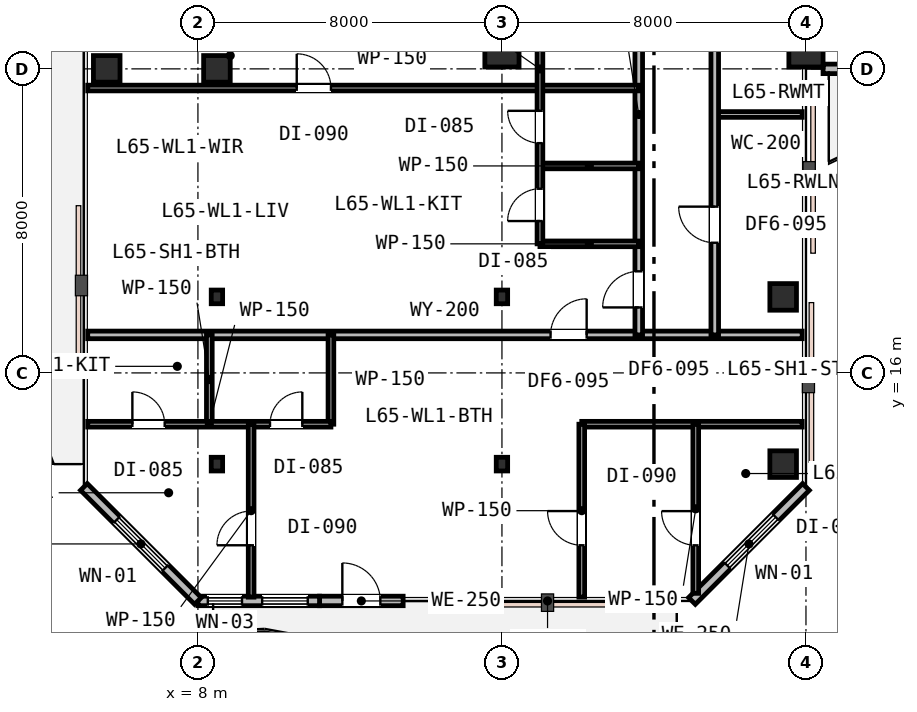
"""IFC4 building model, lengths in metres.
Left out: names, types, materials, properties, quantities, classifications, styles, units other than length and angle.
Written with IfcOpenShell. Run it as: python <this file> out.ifc"""

import sys

from ifc_helpers import new_model, si_unit, direction, frame, frame_2d, origin, origin_2d, place, context, subcontext, project, spatial, rectangle, i_section, extrude, element, fill, save


model = new_model("IFC4")
c1 = context("Model", 3, precision=1e-05, world=origin(), true_north=direction((0.0, 1.0)))
c2 = subcontext(c1, "Body", "Model", "MODEL_VIEW")
j1 = project(units=[si_unit("LENGTHUNIT", "METRE"), si_unit("PLANEANGLEUNIT", "RADIAN")], contexts=[c1])
p1 = place(None, origin())
s1 = spatial("IfcSite", under=j1, at=p1, CompositionType="ELEMENT")
p2 = place(p1, origin())
s2 = spatial("IfcBuilding", under=s1, at=p2, CompositionType="ELEMENT")
p3 = place(p2, frame((0.0, 0.0, 252.6)))
s3 = spatial("IfcBuildingStorey", under=s2, at=p3, CompositionType="ELEMENT", Elevation=252.6)
p4 = place(p3, frame((8.5, 24.0, 0.0), z_axis=(0.0, 0.0, 1.0), x_axis=(1.0, 0.0, 0.0)))
e1 = element("IfcColumn", 1, at=p4, inside=s3, PredefinedType="COLUMN", context=c2, shape_type="SweptSolid", body=[
    extrude(rectangle(XDim=0.7, YDim=0.7, at=origin_2d()), origin(), (0.0, 0.0, 1.0), 3.8),
])
for number, where, z_axis, x_axis in (
    (2, (16.0, 24.5, 0.0), (0.0, 0.0, 1.0), (1.0, 0.0, 0.0)),
    (3, (24.0, 24.5, 0.0), (0.0, 0.0, 1.0), (1.0, 0.0, 0.0)),
):
    element("IfcColumn", number, at=place(p3, frame(where, z_axis=z_axis, x_axis=x_axis)), inside=s3, PredefinedType="COLUMN", context=c2, shape_type="SweptSolid", body=[
        extrude(rectangle(XDim=0.9, YDim=0.9, at=origin_2d()), origin(), (0.0, 0.0, 1.0), 3.8),
    ])
for number, where, z_axis, x_axis in (
    (4, (5.6, 24.0, 0.0), (0.0, 0.0, 1.0), (1.0, 0.0, 0.0)),
    (5, (23.4, 13.6, 0.0), (0.0, 0.0, 1.0), (1.0, 0.0, 0.0)),
    (6, (23.4, 18.0, 0.0), (0.0, 0.0, 1.0), (1.0, 0.0, 0.0)),
):
    element("IfcColumn", number, at=place(p3, frame(where, z_axis=z_axis, x_axis=x_axis)), inside=s3, PredefinedType="COLUMN", context=c2, shape_type="SweptSolid", body=[
        extrude(rectangle(XDim=0.7, YDim=0.7, at=origin_2d()), origin(), (0.0, 0.0, 1.0), 3.8),
    ])
for number, where, z_axis, x_axis in (
    (7, (8.5, 13.6, 0.0), (0.0, 0.0, 1.0), (1.0, 0.0, 0.0)),
    (8, (16.0, 13.6, 0.0), (0.0, 0.0, 1.0), (1.0, 0.0, 0.0)),
    (9, (8.5, 18.0, 0.0), (0.0, 0.0, 1.0), (1.0, 0.0, 0.0)),
    (10, (16.0, 18.0, 0.0), (0.0, 0.0, 1.0), (1.0, 0.0, 0.0)),
):
    element("IfcColumn", number, at=place(p3, frame(where, z_axis=z_axis, x_axis=x_axis)), inside=s3, PredefinedType="COLUMN", context=c2, shape_type="SweptSolid", body=[
        extrude(i_section(OverallWidth=0.3, OverallDepth=0.36, WebThickness=0.013, FlangeThickness=0.022, FilletRadius=0.027, at=origin_2d()), origin(), (0.0, 0.0, 1.0), 3.8),
    ])
p5 = place(p3, frame((11.2, 10.0, 0.0), z_axis=(0.0, 0.0, 1.0), x_axis=(1.0, 0.0, 0.0)))
e11 = element("IfcWall", 11, at=p5, inside=s3, PredefinedType="STANDARD", context=c2, shape_type="SweptSolid", body=[
    extrude(rectangle(XDim=2.2, YDim=0.25, at=frame_2d((1.1, 0.0))), origin(), (0.0, 0.0, 1.0), 3.53),
])
p6 = place(p5, frame((0.6, 0.0, 0.0)))
e12 = element("IfcOpeningElement", 12, at=p6, cuts=e11, PredefinedType="OPENING", context=c2, shape_type="SweptSolid", body=[
    extrude(rectangle(XDim=1.0, YDim=2.15, at=frame_2d((0.5, 1.075))), frame((0.0, 0.135, 0.0), z_axis=(0.0, -1.0, 0.0), x_axis=(1.0, 0.0, 0.0)), (0.0, 0.0, 1.0), 0.27),
])
p7 = place(p3, frame((8.0, 10.0, 0.0), z_axis=(0.0, 0.0, 1.0), x_axis=(1.0, 0.0, 0.0)))
e13 = element("IfcWall", 13, at=p7, inside=s3, PredefinedType="STANDARD", context=c2, shape_type="SweptSolid", body=[
    extrude(rectangle(XDim=3.2, YDim=0.25, at=frame_2d((1.6, 0.0))), origin(), (0.0, 0.0, 1.0), 3.53),
])
p8 = place(p7, frame((0.26, 0.0, 0.9)))
e14 = element("IfcOpeningElement", 14, at=p8, cuts=e13, PredefinedType="OPENING", context=c2, shape_type="SweptSolid", body=[
    extrude(rectangle(XDim=0.9, YDim=1.55, at=frame_2d((0.45, 0.775))), frame((0.0, 0.135, 0.0), z_axis=(0.0, -1.0, 0.0), x_axis=(1.0, 0.0, 0.0)), (0.0, 0.0, 1.0), 0.27),
])
p9 = place(p7, frame((1.69, 0.0, 0.85)))
e15 = element("IfcOpeningElement", 15, at=p9, cuts=e13, PredefinedType="OPENING", context=c2, shape_type="SweptSolid", body=[
    extrude(rectangle(XDim=1.2, YDim=1.6, at=frame_2d((0.6, 0.8))), frame((0.0, 0.135, 0.0), z_axis=(0.0, -1.0, 0.0), x_axis=(1.0, 0.0, 0.0)), (0.0, 0.0, 1.0), 0.27),
])
p10 = place(p3, frame((21.0, 10.0, 0.0), z_axis=(0.0, 0.0, 1.0), x_axis=(0.707106781187, 0.707106781187, 0.0)))
e16 = element("IfcWall", 16, at=p10, inside=s3, PredefinedType="STANDARD", context=c2, shape_type="SweptSolid", body=[
    extrude(rectangle(XDim=4.243, YDim=0.25, at=frame_2d((2.121, 0.0))), origin(), (0.0, 0.0, 1.0), 3.53),
])
p11 = place(p10, frame((1.317, 0.0, 0.75)))
e17 = element("IfcOpeningElement", 17, at=p11, cuts=e16, PredefinedType="OPENING", context=c2, shape_type="SweptSolid", body=[
    extrude(rectangle(XDim=1.8, YDim=1.85, at=frame_2d((0.9, 0.925))), frame((0.0, 0.135, 0.0), z_axis=(0.0, -1.0, 0.0), x_axis=(1.0, 0.0, 0.0)), (0.0, 0.0, 1.0), 0.27),
])
p12 = place(p3, frame((24.45, 24.0, 0.0), z_axis=(0.0, 0.0, 1.0), x_axis=(1.0, 0.0, 0.0)))
e18 = element("IfcWall", 18, at=p12, inside=s3, PredefinedType="STANDARD", context=c2, shape_type="SweptSolid", body=[
    extrude(rectangle(XDim=0.95, YDim=0.25, at=frame_2d((0.475, 0.0))), origin(), (0.0, 0.0, 1.0), 3.27),
])
p13 = place(p3, frame((5.0, 13.0, 0.0), z_axis=(0.0, 0.0, 1.0), x_axis=(0.707106781187, -0.707106781187, 0.0)))
e19 = element("IfcWall", 19, at=p13, inside=s3, PredefinedType="STANDARD", context=c2, shape_type="SweptSolid", body=[
    extrude(rectangle(XDim=4.243, YDim=0.25, at=frame_2d((2.121, 0.0))), origin(), (0.0, 0.0, 1.0), 3.53),
])
p14 = place(p13, frame((1.221, 0.0, 0.75)))
e20 = element("IfcOpeningElement", 20, at=p14, cuts=e19, PredefinedType="OPENING", context=c2, shape_type="SweptSolid", body=[
    extrude(rectangle(XDim=1.8, YDim=1.85, at=frame_2d((0.9, 0.925))), frame((0.0, 0.135, 0.0), z_axis=(0.0, -1.0, 0.0), x_axis=(1.0, 0.0, 0.0)), (0.0, 0.0, 1.0), 0.27),
])
p15 = place(p3, frame((5.1, 17.0, 0.0), z_axis=(0.0, 0.0, 1.0), x_axis=(1.0, 0.0, 0.0)))
e21 = element("IfcWall", 21, at=p15, inside=s3, PredefinedType="PARTITIONING", context=c2, shape_type="SweptSolid", body=[
    extrude(rectangle(XDim=18.8, YDim=0.2, at=frame_2d((9.4, 0.0))), origin(), (0.0, 0.0, 1.0), 3.16),
])
p16 = place(p15, frame((12.179, 0.0, 0.0)))
e22 = element("IfcOpeningElement", 22, at=p16, cuts=e21, PredefinedType="OPENING", context=c2, shape_type="SweptSolid", body=[
    extrude(rectangle(XDim=0.95, YDim=2.15, at=frame_2d((0.475, 1.075))), frame((0.0, 0.11, 0.0), z_axis=(0.0, -1.0, 0.0), x_axis=(1.0, 0.0, 0.0)), (0.0, 0.0, 1.0), 0.22),
])
p17 = place(p3, frame((19.6, 17.0, 0.0), z_axis=(0.0, 0.0, 1.0), x_axis=(0.0, 1.0, 0.0)))
e23 = element("IfcWall", 23, at=p17, inside=s3, PredefinedType="PARTITIONING", context=c2, shape_type="SweptSolid", body=[
    extrude(rectangle(XDim=11.6, YDim=0.2, at=frame_2d((5.8, 0.0))), origin(), (0.0, 0.0, 1.0), 3.16),
])
p18 = place(p17, frame((0.723, 0.0, 0.0)))
e24 = element("IfcOpeningElement", 24, at=p18, cuts=e23, PredefinedType="OPENING", context=c2, shape_type="SweptSolid", body=[
    extrude(rectangle(XDim=0.95, YDim=2.15, at=frame_2d((0.475, 1.075))), frame((0.0, 0.11, 0.0), z_axis=(0.0, -1.0, 0.0), x_axis=(1.0, 0.0, 0.0)), (0.0, 0.0, 1.0), 0.22),
])
for number, where, z_axis, x_axis in (
    (25, (17.0, 19.396, 0.0), (0.0, 0.0, 1.0), (1.0, 0.0, 0.0)),
    (26, (17.0, 21.446, 0.0), (0.0, 0.0, 1.0), (1.0, 0.0, 0.0)),
):
    element("IfcWall", number, at=place(p3, frame(where, z_axis=z_axis, x_axis=x_axis)), inside=s3, PredefinedType="PARTITIONING", context=c2, shape_type="SweptSolid", body=[
        extrude(rectangle(XDim=2.6, YDim=0.15, at=frame_2d((1.3, 0.0))), origin(), (0.0, 0.0, 1.0), 3.53),
    ])
p19 = place(p3, frame((5.1, 23.496, 0.0), z_axis=(0.0, 0.0, 1.0), x_axis=(1.0, 0.0, 0.0)))
e27 = element("IfcWall", 27, at=p19, inside=s3, PredefinedType="PARTITIONING", context=c2, shape_type="SweptSolid", body=[
    extrude(rectangle(XDim=14.5, YDim=0.15, at=frame_2d((7.25, 0.0))), origin(), (0.0, 0.0, 1.0), 3.16),
])
p20 = place(p19, frame((5.5, 0.0, 0.0)))
e28 = element("IfcOpeningElement", 28, at=p20, cuts=e27, PredefinedType="OPENING", context=c2, shape_type="SweptSolid", body=[
    extrude(rectangle(XDim=0.9, YDim=2.15, at=frame_2d((0.45, 1.075))), frame((0.0, 0.085, 0.0), z_axis=(0.0, -1.0, 0.0), x_axis=(1.0, 0.0, 0.0)), (0.0, 0.0, 1.0), 0.17),
])
p21 = place(p3, frame((17.0, 19.396, 0.0), z_axis=(0.0, 0.0, 1.0), x_axis=(0.0, 1.0, 0.0)))
e29 = element("IfcWall", 29, at=p21, inside=s3, PredefinedType="PARTITIONING", context=c2, shape_type="SweptSolid", body=[
    extrude(rectangle(XDim=9.204, YDim=0.15, at=frame_2d((4.602, 0.0))), origin(), (0.0, 0.0, 1.0), 3.16),
])
p22 = place(p21, frame((0.6, 0.0, 0.0)))
e30 = element("IfcOpeningElement", 30, at=p22, cuts=e29, PredefinedType="OPENING", context=c2, shape_type="SweptSolid", body=[
    extrude(rectangle(XDim=0.85, YDim=2.15, at=frame_2d((0.425, 1.075))), frame((0.0, 0.085, 0.0), z_axis=(0.0, -1.0, 0.0), x_axis=(1.0, 0.0, 0.0)), (0.0, 0.0, 1.0), 0.17),
])
p23 = place(p21, frame((2.65, 0.0, 0.0)))
e31 = element("IfcOpeningElement", 31, at=p23, cuts=e29, PredefinedType="OPENING", context=c2, shape_type="SweptSolid", body=[
    extrude(rectangle(XDim=0.85, YDim=2.15, at=frame_2d((0.425, 1.075))), frame((0.0, 0.085, 0.0), z_axis=(0.0, -1.0, 0.0), x_axis=(1.0, 0.0, 0.0)), (0.0, 0.0, 1.0), 0.17),
])
p24 = place(p21, frame((6.593, 0.0, 0.0)))
e32 = element("IfcOpeningElement", 32, at=p24, cuts=e29, PredefinedType="OPENING", context=c2, shape_type="SweptSolid", body=[
    extrude(rectangle(XDim=0.85, YDim=2.15, at=frame_2d((0.425, 1.075))), frame((0.0, 0.085, 0.0), z_axis=(0.0, -1.0, 0.0), x_axis=(1.0, 0.0, 0.0)), (0.0, 0.0, 1.0), 0.17),
])
p25 = place(p3, frame((21.6, 22.8, 0.0), z_axis=(0.0, 0.0, 1.0), x_axis=(1.0, 0.0, 0.0)))
e33 = element("IfcWall", 33, at=p25, inside=s3, PredefinedType="PARTITIONING", context=c2, shape_type="SweptSolid", body=[
    extrude(rectangle(XDim=2.3, YDim=0.15, at=frame_2d((1.15, 0.0))), origin(), (0.0, 0.0, 1.0), 3.53),
])
p26 = place(p3, frame((21.6, 17.0, 0.0), z_axis=(0.0, 0.0, 1.0), x_axis=(0.0, 1.0, 0.0)))
e34 = element("IfcWall", 34, at=p26, inside=s3, PredefinedType="PARTITIONING", context=c2, shape_type="SweptSolid", body=[
    extrude(rectangle(XDim=11.6, YDim=0.2, at=frame_2d((5.8, 0.0))), origin(), (0.0, 0.0, 1.0), 3.16),
])
p27 = place(p26, frame((8.994, 0.0, 0.0)))
e35 = element("IfcOpeningElement", 35, at=p27, cuts=e34, PredefinedType="OPENING", context=c2, shape_type="SweptSolid", body=[
    extrude(rectangle(XDim=0.95, YDim=2.15, at=frame_2d((0.475, 1.075))), frame((0.0, 0.11, 0.0), z_axis=(0.0, -1.0, 0.0), x_axis=(1.0, 0.0, 0.0)), (0.0, 0.0, 1.0), 0.22),
])
p28 = place(p26, frame((2.425, 0.0, 0.0)))
e36 = element("IfcOpeningElement", 36, at=p28, cuts=e34, PredefinedType="OPENING", context=c2, shape_type="SweptSolid", body=[
    extrude(rectangle(XDim=0.95, YDim=2.15, at=frame_2d((0.475, 1.075))), frame((0.0, 0.11, 0.0), z_axis=(0.0, -1.0, 0.0), x_axis=(1.0, 0.0, 0.0)), (0.0, 0.0, 1.0), 0.22),
])
p29 = place(p3, frame((11.5, 14.65, 0.0), z_axis=(0.0, 0.0, 1.0), x_axis=(0.0, 1.0, 0.0)))
e37 = element("IfcWall", 37, at=p29, inside=s3, PredefinedType="PARTITIONING", context=c2, shape_type="SweptSolid", body=[
    extrude(rectangle(XDim=2.35, YDim=0.15, at=frame_2d((1.175, 0.0))), origin(), (0.0, 0.0, 1.0), 3.28),
])
p30 = place(p3, frame((8.3, 14.65, 0.0), z_axis=(0.0, 0.0, 1.0), x_axis=(0.0, 1.0, 0.0)))
e38 = element("IfcWall", 38, at=p30, inside=s3, PredefinedType="PARTITIONING", context=c2, shape_type="SweptSolid", body=[
    extrude(rectangle(XDim=2.35, YDim=0.15, at=frame_2d((1.175, 0.0))), origin(), (0.0, 0.0, 1.0), 3.16),
])
p31 = place(p3, frame((5.1, 14.65, 0.0), z_axis=(0.0, 0.0, 1.0), x_axis=(1.0, 0.0, 0.0)))
e39 = element("IfcWall", 39, at=p31, inside=s3, PredefinedType="PARTITIONING", context=c2, shape_type="SweptSolid", body=[
    extrude(rectangle(XDim=6.4, YDim=0.15, at=frame_2d((3.2, 0.0))), origin(), (0.0, 0.0, 1.0), 3.16),
])
p32 = place(p31, frame((1.175, 0.0, 0.0)))
e40 = element("IfcOpeningElement", 40, at=p32, cuts=e39, PredefinedType="OPENING", context=c2, shape_type="SweptSolid", body=[
    extrude(rectangle(XDim=0.85, YDim=2.15, at=frame_2d((0.425, 1.075))), frame((0.0, 0.085, 0.0), z_axis=(0.0, -1.0, 0.0), x_axis=(1.0, 0.0, 0.0)), (0.0, 0.0, 1.0), 0.17),
])
p33 = place(p31, frame((4.797, 0.0, 0.0)))
e41 = element("IfcOpeningElement", 41, at=p33, cuts=e39, PredefinedType="OPENING", context=c2, shape_type="SweptSolid", body=[
    extrude(rectangle(XDim=0.85, YDim=2.15, at=frame_2d((0.425, 1.075))), frame((0.0, 0.085, 0.0), z_axis=(0.0, -1.0, 0.0), x_axis=(1.0, 0.0, 0.0)), (0.0, 0.0, 1.0), 0.17),
])
p34 = place(p3, frame((18.1, 14.65, 0.0), z_axis=(0.0, 0.0, 1.0), x_axis=(1.0, 0.0, 0.0)))
e42 = element("IfcWall", 42, at=p34, inside=s3, PredefinedType="PARTITIONING", context=c2, shape_type="SweptSolid", body=[
    extrude(rectangle(XDim=5.8, YDim=0.15, at=frame_2d((2.9, 0.0))), origin(), (0.0, 0.0, 1.0), 3.53),
])
p35 = place(p3, frame((9.4, 10.1, 0.0), z_axis=(0.0, 0.0, 1.0), x_axis=(0.0, 1.0, 0.0)))
e43 = element("IfcWall", 43, at=p35, inside=s3, PredefinedType="PARTITIONING", context=c2, shape_type="SweptSolid", body=[
    extrude(rectangle(XDim=4.55, YDim=0.15, at=frame_2d((2.275, 0.0))), origin(), (0.0, 0.0, 1.0), 3.16),
])
p36 = place(p35, frame((1.365, 0.0, 0.0)))
e44 = element("IfcOpeningElement", 44, at=p36, cuts=e43, PredefinedType="OPENING", context=c2, shape_type="SweptSolid", body=[
    extrude(rectangle(XDim=0.9, YDim=2.15, at=frame_2d((0.45, 1.075))), frame((0.0, 0.085, 0.0), z_axis=(0.0, -1.0, 0.0), x_axis=(1.0, 0.0, 0.0)), (0.0, 0.0, 1.0), 0.17),
])
p37 = place(p3, frame((21.1, 10.2, 0.0), z_axis=(0.0, 0.0, 1.0), x_axis=(0.0, 1.0, 0.0)))
e45 = element("IfcWall", 45, at=p37, inside=s3, PredefinedType="PARTITIONING", context=c2, shape_type="SweptSolid", body=[
    extrude(rectangle(XDim=4.45, YDim=0.15, at=frame_2d((2.225, 0.0))), origin(), (0.0, 0.0, 1.0), 3.53),
])
p38 = place(p37, frame((1.263, 0.0, 0.0)))
e46 = element("IfcOpeningElement", 46, at=p38, cuts=e45, PredefinedType="OPENING", context=c2, shape_type="SweptSolid", body=[
    extrude(rectangle(XDim=0.9, YDim=2.15, at=frame_2d((0.45, 1.075))), frame((0.0, 0.085, 0.0), z_axis=(0.0, -1.0, 0.0), x_axis=(1.0, 0.0, 0.0)), (0.0, 0.0, 1.0), 0.17),
])
p39 = place(p3, frame((18.1, 10.1, 0.0), z_axis=(0.0, 0.0, 1.0), x_axis=(0.0, 1.0, 0.0)))
e47 = element("IfcWall", 47, at=p39, inside=s3, PredefinedType="PARTITIONING", context=c2, shape_type="SweptSolid", body=[
    extrude(rectangle(XDim=4.55, YDim=0.15, at=frame_2d((2.275, 0.0))), origin(), (0.0, 0.0, 1.0), 3.53),
])
p40 = place(p39, frame((1.365, 0.0, 0.0)))
e48 = element("IfcOpeningElement", 48, at=p40, cuts=e47, PredefinedType="OPENING", context=c2, shape_type="SweptSolid", body=[
    extrude(rectangle(XDim=0.9, YDim=2.15, at=frame_2d((0.45, 1.075))), frame((0.0, 0.085, 0.0), z_axis=(0.0, -1.0, 0.0), x_axis=(1.0, 0.0, 0.0)), (0.0, 0.0, 1.0), 0.17),
])
p41 = place(p6, origin())
e49 = element("IfcDoor", 49, at=p41, inside=s3, OperationType="SINGLE_SWING_LEFT", PredefinedType="DOOR", context=c2, shape_type="SweptSolid", body=[
    extrude(rectangle(XDim=1.0, YDim=2.15, at=frame_2d((0.5, 1.075))), frame((0.0, 0.025, 0.0), z_axis=(0.0, -1.0, 0.0), x_axis=(1.0, 0.0, 0.0)), (0.0, 0.0, 1.0), 0.05),
])
fill(e12, e49)
p42 = place(p8, origin())
e50 = element("IfcWindow", 50, at=p42, inside=s3, PartitioningType="SINGLE_PANEL", PredefinedType="WINDOW", context=c2, shape_type="SweptSolid", body=[
    extrude(rectangle(XDim=0.9, YDim=1.55, at=frame_2d((0.45, 0.775))), frame((0.0, 0.03, 0.0), z_axis=(0.0, -1.0, 0.0), x_axis=(1.0, 0.0, 0.0)), (0.0, 0.0, 1.0), 0.06),
])
fill(e14, e50)
p43 = place(p9, origin())
e51 = element("IfcWindow", 51, at=p43, inside=s3, PartitioningType="SINGLE_PANEL", PredefinedType="WINDOW", context=c2, shape_type="SweptSolid", body=[
    extrude(rectangle(XDim=1.2, YDim=1.6, at=frame_2d((0.6, 0.8))), frame((0.0, 0.03, 0.0), z_axis=(0.0, -1.0, 0.0), x_axis=(1.0, 0.0, 0.0)), (0.0, 0.0, 1.0), 0.06),
])
fill(e15, e51)
p44 = place(p11, origin())
e52 = element("IfcWindow", 52, at=p44, inside=s3, PartitioningType="SINGLE_PANEL", PredefinedType="WINDOW", context=c2, shape_type="SweptSolid", body=[
    extrude(rectangle(XDim=1.8, YDim=1.85, at=frame_2d((0.9, 0.925))), frame((0.0, 0.03, 0.0), z_axis=(0.0, -1.0, 0.0), x_axis=(1.0, 0.0, 0.0)), (0.0, 0.0, 1.0), 0.06),
])
fill(e17, e52)
p45 = place(p14, origin())
e53 = element("IfcWindow", 53, at=p45, inside=s3, PartitioningType="SINGLE_PANEL", PredefinedType="WINDOW", context=c2, shape_type="SweptSolid", body=[
    extrude(rectangle(XDim=1.8, YDim=1.85, at=frame_2d((0.9, 0.925))), frame((0.0, 0.03, 0.0), z_axis=(0.0, -1.0, 0.0), x_axis=(1.0, 0.0, 0.0)), (0.0, 0.0, 1.0), 0.06),
])
fill(e20, e53)
p46 = place(p18, origin())
e54 = element("IfcDoor", 54, at=p46, inside=s3, OperationType="SINGLE_SWING_LEFT", PredefinedType="DOOR", context=c2, shape_type="SweptSolid", body=[
    extrude(rectangle(XDim=0.95, YDim=2.15, at=frame_2d((0.475, 1.075))), frame((0.0, 0.025, 0.0), z_axis=(0.0, -1.0, 0.0), x_axis=(1.0, 0.0, 0.0)), (0.0, 0.0, 1.0), 0.05),
])
fill(e24, e54)
p47 = place(p22, origin())
e55 = element("IfcDoor", 55, at=p47, inside=s3, OperationType="SINGLE_SWING_LEFT", PredefinedType="DOOR", context=c2, shape_type="SweptSolid", body=[
    extrude(rectangle(XDim=0.85, YDim=2.15, at=frame_2d((0.425, 1.075))), frame((0.0, 0.025, 0.0), z_axis=(0.0, -1.0, 0.0), x_axis=(1.0, 0.0, 0.0)), (0.0, 0.0, 1.0), 0.05),
])
fill(e30, e55)
p48 = place(p23, origin())
e56 = element("IfcDoor", 56, at=p48, inside=s3, OperationType="SINGLE_SWING_RIGHT", PredefinedType="DOOR", context=c2, shape_type="SweptSolid", body=[
    extrude(rectangle(XDim=0.85, YDim=2.15, at=frame_2d((0.425, 1.075))), frame((0.0, 0.025, 0.0), z_axis=(0.0, -1.0, 0.0), x_axis=(1.0, 0.0, 0.0)), (0.0, 0.0, 1.0), 0.05),
])
fill(e31, e56)
p49 = place(p20, origin())
e57 = element("IfcDoor", 57, at=p49, inside=s3, OperationType="SINGLE_SWING_LEFT", PredefinedType="DOOR", context=c2, shape_type="SweptSolid", body=[
    extrude(rectangle(XDim=0.9, YDim=2.15, at=frame_2d((0.45, 1.075))), frame((0.0, 0.025, 0.0), z_axis=(0.0, -1.0, 0.0), x_axis=(1.0, 0.0, 0.0)), (0.0, 0.0, 1.0), 0.05),
])
fill(e28, e57)
p50 = place(p28, origin())
e58 = element("IfcDoor", 58, at=p50, inside=s3, OperationType="SINGLE_SWING_RIGHT", PredefinedType="DOOR", context=c2, shape_type="SweptSolid", body=[
    extrude(rectangle(XDim=0.95, YDim=2.15, at=frame_2d((0.475, 1.075))), frame((0.0, 0.025, 0.0), z_axis=(0.0, -1.0, 0.0), x_axis=(1.0, 0.0, 0.0)), (0.0, 0.0, 1.0), 0.05),
])
fill(e36, e58)
p51 = place(p16, origin())
e59 = element("IfcDoor", 59, at=p51, inside=s3, OperationType="SINGLE_SWING_RIGHT", PredefinedType="DOOR", context=c2, shape_type="SweptSolid", body=[
    extrude(rectangle(XDim=0.95, YDim=2.15, at=frame_2d((0.475, 1.075))), frame((0.0, 0.025, 0.0), z_axis=(0.0, -1.0, 0.0), x_axis=(1.0, 0.0, 0.0)), (0.0, 0.0, 1.0), 0.05),
])
fill(e22, e59)
p52 = place(p32, origin())
e60 = element("IfcDoor", 60, at=p52, inside=s3, OperationType="SINGLE_SWING_LEFT", PredefinedType="DOOR", context=c2, shape_type="SweptSolid", body=[
    extrude(rectangle(XDim=0.85, YDim=2.15, at=frame_2d((0.425, 1.075))), frame((0.0, 0.025, 0.0), z_axis=(0.0, -1.0, 0.0), x_axis=(1.0, 0.0, 0.0)), (0.0, 0.0, 1.0), 0.05),
])
fill(e40, e60)
p53 = place(p33, origin())
e61 = element("IfcDoor", 61, at=p53, inside=s3, OperationType="SINGLE_SWING_RIGHT", PredefinedType="DOOR", context=c2, shape_type="SweptSolid", body=[
    extrude(rectangle(XDim=0.85, YDim=2.15, at=frame_2d((0.425, 1.075))), frame((0.0, 0.025, 0.0), z_axis=(0.0, -1.0, 0.0), x_axis=(1.0, 0.0, 0.0)), (0.0, 0.0, 1.0), 0.05),
])
fill(e41, e61)
p54 = place(p36, origin())
e62 = element("IfcDoor", 62, at=p54, inside=s3, OperationType="SINGLE_SWING_LEFT", PredefinedType="DOOR", context=c2, shape_type="SweptSolid", body=[
    extrude(rectangle(XDim=0.9, YDim=2.15, at=frame_2d((0.45, 1.075))), frame((0.0, 0.025, 0.0), z_axis=(0.0, -1.0, 0.0), x_axis=(1.0, 0.0, 0.0)), (0.0, 0.0, 1.0), 0.05),
])
fill(e44, e62)
p55 = place(p38, origin())
e63 = element("IfcDoor", 63, at=p55, inside=s3, OperationType="SINGLE_SWING_RIGHT", PredefinedType="DOOR", context=c2, shape_type="SweptSolid", body=[
    extrude(rectangle(XDim=0.9, YDim=2.15, at=frame_2d((0.45, 1.075))), frame((0.0, 0.025, 0.0), z_axis=(0.0, -1.0, 0.0), x_axis=(1.0, 0.0, 0.0)), (0.0, 0.0, 1.0), 0.05),
])
fill(e46, e63)
p56 = place(p40, origin())
e64 = element("IfcDoor", 64, at=p56, inside=s3, OperationType="SINGLE_SWING_RIGHT", PredefinedType="DOOR", context=c2, shape_type="SweptSolid", body=[
    extrude(rectangle(XDim=0.9, YDim=2.15, at=frame_2d((0.45, 1.075))), frame((0.0, 0.025, 0.0), z_axis=(0.0, -1.0, 0.0), x_axis=(1.0, 0.0, 0.0)), (0.0, 0.0, 1.0), 0.05),
])
fill(e48, e64)
save(model, sys.argv[1])
